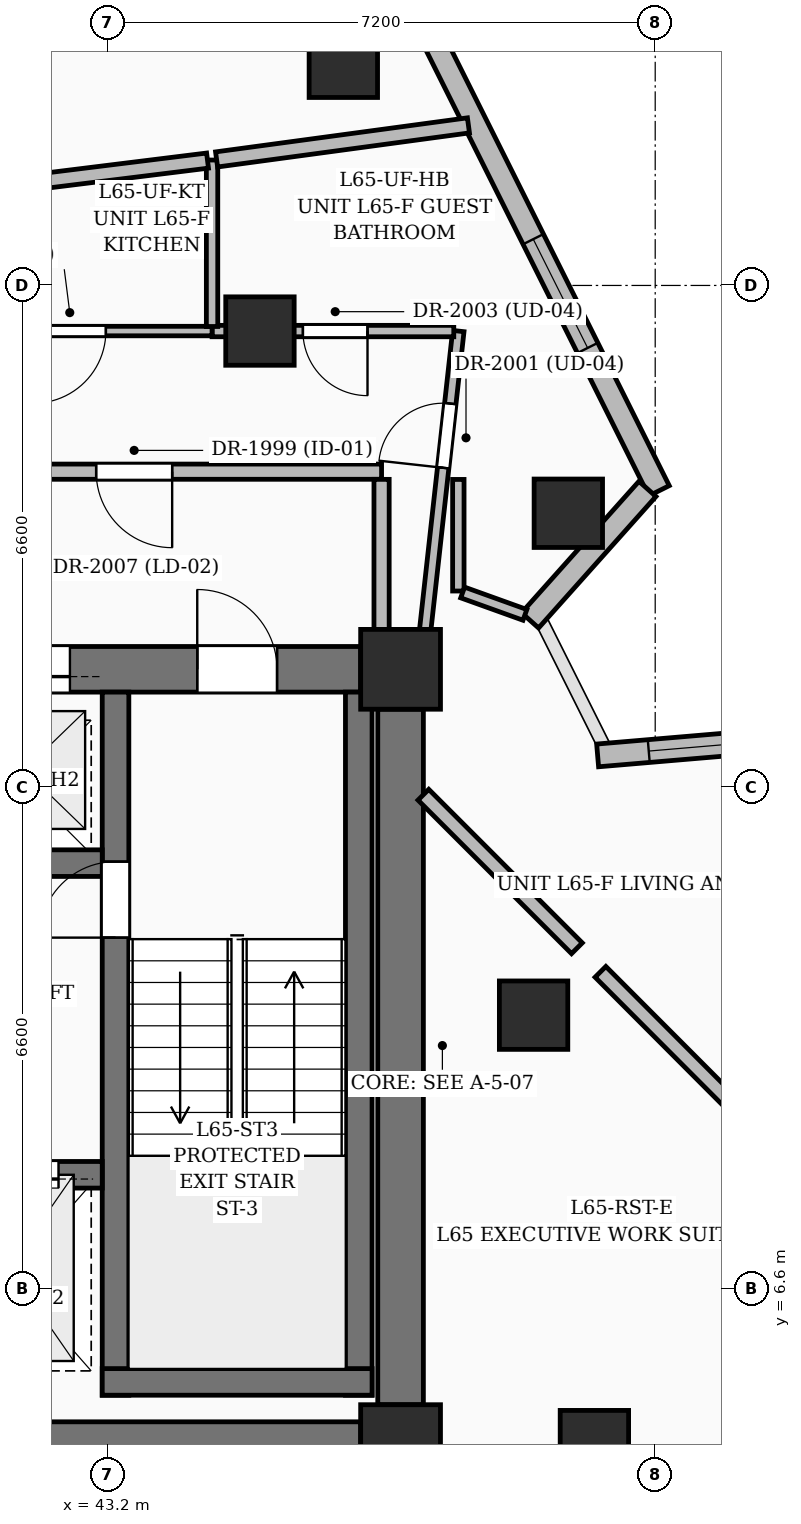
"""IFC4 building model, lengths in metres.
Left out: names, types, materials, properties, quantities, classifications, styles, units other than length and angle.
Written with IfcOpenShell. Run it as: python <this file> out.ifc"""

import sys

from ifc_helpers import new_model, si_unit, direction, frame, frame_2d, origin, origin_2d, place, context, subcontext, project, spatial, rectangle, extrude, element, fill, save


model = new_model("IFC4")
c1 = context("Model", 3, precision=1e-05, world=origin(), true_north=direction((0.0, 1.0)))
c2 = subcontext(c1, "Body", "Model", "MODEL_VIEW")
j1 = project(units=[si_unit("LENGTHUNIT", "METRE"), si_unit("PLANEANGLEUNIT", "RADIAN")], contexts=[c1])
p1 = place(None, origin())
s1 = spatial("IfcSite", under=j1, at=p1, CompositionType="ELEMENT")
p2 = place(p1, origin())
s2 = spatial("IfcBuilding", under=s1, at=p2, CompositionType="ELEMENT")
p3 = place(p2, frame((0.0, 0.0, 252.0)))
s3 = spatial("IfcBuildingStorey", under=s2, at=p3, CompositionType="ELEMENT", Elevation=252.0)
for number, where, z_axis, x_axis in (
    (1, (47.05, 4.55, 0.0), (0.0, 0.0, 1.0), (1.0, 0.0, 0.0)),
    (2, (47.05, 14.75, 0.0), (0.0, 0.0, 1.0), (1.0, 0.0, 0.0)),
):
    element("IfcColumn", number, at=place(p3, frame(where, z_axis=z_axis, x_axis=x_axis)), inside=s3, PredefinedType="COLUMN", context=c2, shape_type="SweptSolid", body=[
        extrude(rectangle(XDim=1.05, YDim=1.05, at=origin_2d()), origin(), (0.0, 0.0, 1.0), 3.75),
    ])
for number, where, z_axis, x_axis in (
    (3, (49.6, 4.55, 0.0), (0.0, 0.0, 1.0), (1.0, 0.0, 0.0)),
    (4, (48.8, 10.2, 0.0), (0.0, 0.0, 1.0), (1.0, 0.0, 0.0)),
    (5, (45.2, 19.2, 0.0), (0.0, 0.0, 1.0), (1.0, 0.0, 0.0)),
):
    element("IfcColumn", number, at=place(p3, frame(where, z_axis=z_axis, x_axis=x_axis)), inside=s3, PredefinedType="COLUMN", context=c2, shape_type="SweptSolid", body=[
        extrude(rectangle(XDim=0.9, YDim=0.9, at=origin_2d()), origin(), (0.0, 0.0, 1.0), 3.75),
    ])
p4 = place(p3, frame((35.675, 4.55, 0.0), z_axis=(0.0, 0.0, 1.0), x_axis=(1.0, 0.0, 0.0)))
e6 = element("IfcWall", 6, at=p4, inside=s3, PredefinedType="SHEAR", context=c2, shape_type="SweptSolid", body=[
    extrude(rectangle(XDim=10.85, YDim=0.6, at=frame_2d((5.425, 0.0))), origin(), (0.0, 0.0, 1.0), 3.75),
])
p5 = place(p3, frame((35.675, 14.75, 0.0), z_axis=(0.0, 0.0, 1.0), x_axis=(1.0, 0.0, 0.0)))
e7 = element("IfcWall", 7, at=p5, inside=s3, PredefinedType="SHEAR", context=c2, shape_type="SweptSolid", body=[
    extrude(rectangle(XDim=10.85, YDim=0.6, at=frame_2d((5.425, 0.0))), origin(), (0.0, 0.0, 1.0), 3.75),
])
p6 = place(p5, frame((1.1, 0.0, 0.0)))
e8 = element("IfcOpeningElement", 8, at=p6, cuts=e7, PredefinedType="OPENING", context=c2, shape_type="SweptSolid", body=[
    extrude(rectangle(XDim=1.05, YDim=2.15, at=frame_2d((0.525, 1.075))), frame((0.0, 0.31, 0.0), z_axis=(0.0, -1.0, 0.0), x_axis=(1.0, 0.0, 0.0)), (0.0, 0.0, 1.0), 0.62),
])
p7 = place(p5, frame((8.7, 0.0, 0.0)))
e9 = element("IfcOpeningElement", 9, at=p7, cuts=e7, PredefinedType="OPENING", context=c2, shape_type="SweptSolid", body=[
    extrude(rectangle(XDim=1.05, YDim=2.15, at=frame_2d((0.525, 1.075))), frame((0.0, 0.31, 0.0), z_axis=(0.0, -1.0, 0.0), x_axis=(1.0, 0.0, 0.0)), (0.0, 0.0, 1.0), 0.62),
])
p8 = place(p5, frame((3.825, 0.0, 0.0)))
e10 = element("IfcOpeningElement", 10, at=p8, cuts=e7, PredefinedType="OPENING", context=c2, shape_type="SweptSolid", body=[
    extrude(rectangle(XDim=1.2, YDim=2.2, at=frame_2d((0.6, 1.1))), frame((0.0, 0.31, 0.0), z_axis=(0.0, -1.0, 0.0), x_axis=(1.0, 0.0, 0.0)), (0.0, 0.0, 1.0), 0.62),
])
p9 = place(p5, frame((5.825, 0.0, 0.0)))
e11 = element("IfcOpeningElement", 11, at=p9, cuts=e7, PredefinedType="OPENING", context=c2, shape_type="SweptSolid", body=[
    extrude(rectangle(XDim=1.2, YDim=2.2, at=frame_2d((0.6, 1.1))), frame((0.0, 0.31, 0.0), z_axis=(0.0, -1.0, 0.0), x_axis=(1.0, 0.0, 0.0)), (0.0, 0.0, 1.0), 0.62),
])
p10 = place(p3, frame((47.05, 5.075, 0.0), z_axis=(0.0, 0.0, 1.0), x_axis=(0.0, 1.0, 0.0)))
e12 = element("IfcWall", 12, at=p10, inside=s3, PredefinedType="SHEAR", context=c2, shape_type="SweptSolid", body=[
    extrude(rectangle(XDim=9.15, YDim=0.6, at=frame_2d((4.575, 0.0))), origin(), (0.0, 0.0, 1.0), 3.75),
])
p11 = place(p3, frame((43.3, 5.2, 0.0), z_axis=(0.0, 0.0, 1.0), x_axis=(0.0, 1.0, 0.0)))
e13 = element("IfcWall", 13, at=p11, inside=s3, PredefinedType="SOLIDWALL", context=c2, shape_type="SweptSolid", body=[
    extrude(rectangle(XDim=9.25, YDim=0.35, at=frame_2d((4.625, 0.0))), origin(), (0.0, 0.0, 1.0), 3.75),
])
p12 = place(p11, frame((6.02, 0.0, 0.0)))
e14 = element("IfcOpeningElement", 14, at=p12, cuts=e13, PredefinedType="OPENING", context=c2, shape_type="SweptSolid", body=[
    extrude(rectangle(XDim=1.0, YDim=2.15, at=frame_2d((0.5, 1.075))), frame((0.0, 0.185, 0.0), z_axis=(0.0, -1.0, 0.0), x_axis=(1.0, 0.0, 0.0)), (0.0, 0.0, 1.0), 0.37),
])
p13 = place(p3, frame((46.5, 5.2, 0.0), z_axis=(0.0, 0.0, 1.0), x_axis=(0.0, 1.0, 0.0)))
e15 = element("IfcWall", 15, at=p13, inside=s3, PredefinedType="SOLIDWALL", context=c2, shape_type="SweptSolid", body=[
    extrude(rectangle(XDim=9.25, YDim=0.35, at=frame_2d((4.625, 0.0))), origin(), (0.0, 0.0, 1.0), 3.75),
])
p14 = place(p3, frame((43.125, 5.375, 0.0), z_axis=(0.0, 0.0, 1.0), x_axis=(1.0, 0.0, 0.0)))
e16 = element("IfcWall", 16, at=p14, inside=s3, PredefinedType="SOLIDWALL", context=c2, shape_type="SweptSolid", body=[
    extrude(rectangle(XDim=3.55, YDim=0.35, at=frame_2d((1.775, 0.0))), origin(), (0.0, 0.0, 1.0), 3.75),
])
p15 = place(p3, frame((40.55, 8.1, 0.0), z_axis=(0.0, 0.0, 1.0), x_axis=(1.0, 0.0, 0.0)))
e17 = element("IfcWall", 17, at=p15, inside=s3, PredefinedType="SOLIDWALL", context=c2, shape_type="SweptSolid", body=[
    extrude(rectangle(XDim=2.575, YDim=0.35, at=frame_2d((1.288, 0.0))), origin(), (0.0, 0.0, 1.0), 3.75),
])
p16 = place(p15, frame((0.7, 0.0, 0.0)))
e18 = element("IfcOpeningElement", 18, at=p16, cuts=e17, PredefinedType="OPENING", context=c2, shape_type="SweptSolid", body=[
    extrude(rectangle(XDim=1.3, YDim=2.25, at=frame_2d((0.65, 1.125))), frame((0.0, 0.185, 0.0), z_axis=(0.0, -1.0, 0.0), x_axis=(1.0, 0.0, 0.0)), (0.0, 0.0, 1.0), 0.37),
])
p17 = place(p3, frame((39.075, 12.2, 0.0), z_axis=(0.0, 0.0, 1.0), x_axis=(1.0, 0.0, 0.0)))
e19 = element("IfcWall", 19, at=p17, inside=s3, PredefinedType="SOLIDWALL", context=c2, shape_type="SweptSolid", body=[
    extrude(rectangle(XDim=4.05, YDim=0.35, at=frame_2d((2.025, 0.0))), origin(), (0.0, 0.0, 1.0), 3.75),
])
for number, where, z_axis, x_axis in (
    (20, (49.257, 16.803, 0.0), (0.0, 0.0, 1.0), (1.0, 0.0, 0.0)),
    (21, (46.297, 22.723, 0.0), (0.0, 0.0, 1.0), (1.0, 0.0, 0.0)),
):
    element("IfcColumn", number, at=place(p3, frame(where, z_axis=z_axis, x_axis=x_axis)), inside=s3, PredefinedType="COLUMN", context=c2, shape_type="SweptSolid", body=[
        extrude(rectangle(XDim=0.9, YDim=0.9, at=origin_2d()), origin(), (0.0, 0.0, 1.0), 3.75),
    ])
p18 = place(p3, frame((47.409, 23.182, 0.0), z_axis=(0.0, 0.0, 1.0), x_axis=(0.447227954985, -0.894420011113, 0.0)))
e22 = element("IfcWall", 22, at=p18, inside=s3, PredefinedType="SOLIDWALL", context=c2, shape_type="SweptSolid", body=[
    extrude(rectangle(XDim=6.801, YDim=0.3, at=frame_2d((3.4, 0.0))), origin(), (0.0, 0.0, 1.0), 3.5),
])
p19 = place(p18, frame((3.1, 0.0, 0.55)))
e23 = element("IfcOpeningElement", 23, at=p19, cuts=e22, PredefinedType="OPENING", context=c2, shape_type="SweptSolid", body=[
    extrude(rectangle(XDim=1.6, YDim=2.2, at=frame_2d((0.8, 1.1))), frame((0.0, 0.16, 0.0), z_axis=(0.0, -1.0, 0.0), x_axis=(1.0, 0.0, 0.0)), (0.0, 0.0, 1.0), 0.32),
])
p20 = place(p3, frame((50.298, 17.123, 0.0), z_axis=(0.0, 0.0, 1.0), x_axis=(-0.665963458611, -0.74598436431, 0.0)))
e24 = element("IfcWall", 24, at=p20, inside=s3, PredefinedType="SOLIDWALL", context=c2, shape_type="SweptSolid", body=[
    extrude(rectangle(XDim=2.319, YDim=0.3, at=frame_2d((1.159, 0.0))), origin(), (0.0, 0.0, 1.0), 2.825),
])
p21 = place(p3, frame((49.643, 13.617, 0.0), z_axis=(0.0, 0.0, 1.0), x_axis=(0.996404097451, 0.084728239579, 0.0)))
e25 = element("IfcWall", 25, at=p21, inside=s3, PredefinedType="SOLIDWALL", context=c2, shape_type="SweptSolid", body=[
    extrude(rectangle(XDim=2.593, YDim=0.3, at=frame_2d((1.297, 0.0))), origin(), (0.0, 0.0, 1.0), 2.825),
])
p22 = place(p21, frame((0.675, 0.0, 0.8)))
e26 = element("IfcOpeningElement", 26, at=p22, cuts=e25, PredefinedType="OPENING", context=c2, shape_type="SweptSolid", body=[
    extrude(rectangle(XDim=1.2, YDim=1.8, at=frame_2d((0.6, 0.9))), frame((0.0, 0.16, 0.0), z_axis=(0.0, -1.0, 0.0), x_axis=(1.0, 0.0, 0.0)), (0.0, 0.0, 1.0), 0.32),
])
p23 = place(p3, frame((46.8, 17.35, 0.0), z_axis=(0.0, 0.0, 1.0), x_axis=(-1.0, 0.0, 0.0)))
e27 = element("IfcWall", 27, at=p23, inside=s3, PredefinedType="PARTITIONING", context=c2, shape_type="SweptSolid", body=[
    extrude(rectangle(XDim=6.51, YDim=0.2, at=frame_2d((3.255, 0.0))), origin(), (0.0, 0.0, 1.0), 2.685),
])
p24 = place(p23, frame((2.755, 0.0, 0.0)))
e28 = element("IfcOpeningElement", 28, at=p24, cuts=e27, PredefinedType="OPENING", context=c2, shape_type="SweptSolid", body=[
    extrude(rectangle(XDim=1.0, YDim=2.2, at=frame_2d((0.5, 1.1))), frame((0.0, 0.11, 0.0), z_axis=(0.0, -1.0, 0.0), x_axis=(1.0, 0.0, 0.0)), (0.0, 0.0, 1.0), 0.22),
])
p25 = place(p3, frame((49.37, 11.08, 0.0), z_axis=(0.0, 0.0, 1.0), x_axis=(-0.707106781187, 0.707106781187, 0.0)))
e29 = element("IfcWall", 29, at=p25, inside=s3, PredefinedType="PARTITIONING", context=c2, shape_type="SweptSolid", body=[
    extrude(rectangle(XDim=2.857, YDim=0.2, at=frame_2d((1.428, 0.0))), origin(), (0.0, 0.0, 1.0), 3.5),
])
p26 = place(p3, frame((47.35, 15.05, 0.0), z_axis=(0.0, 0.0, 1.0), x_axis=(0.110161978568, 0.993913647395, 0.0)))
e30 = element("IfcWall", 30, at=p26, inside=s3, PredefinedType="PARTITIONING", context=c2, shape_type="SweptSolid", body=[
    extrude(rectangle(XDim=4.175, YDim=0.15, at=frame_2d((2.088, 0.0))), origin(), (0.0, 0.0, 1.0), 2.764),
])
p27 = place(p26, frame((2.365, 0.0, 0.0)))
e31 = element("IfcOpeningElement", 31, at=p27, cuts=e30, PredefinedType="OPENING", context=c2, shape_type="SweptSolid", body=[
    extrude(rectangle(XDim=0.85, YDim=2.1, at=frame_2d((0.425, 1.05))), frame((0.0, 0.085, 0.0), z_axis=(0.0, -1.0, 0.0), x_axis=(1.0, 0.0, 0.0)), (0.0, 0.0, 1.0), 0.17),
])
p28 = place(p3, frame((47.75, 19.2, 0.0), z_axis=(0.0, 0.0, 1.0), x_axis=(-1.0, 0.0, 0.0)))
e32 = element("IfcWall", 32, at=p28, inside=s3, PredefinedType="PARTITIONING", context=c2, shape_type="SweptSolid", body=[
    extrude(rectangle(XDim=3.18, YDim=0.15, at=frame_2d((1.59, 0.0))), origin(), (0.0, 0.0, 1.0), 2.82),
])
p29 = place(p28, frame((1.135, 0.0, 0.0)))
e33 = element("IfcOpeningElement", 33, at=p29, cuts=e32, PredefinedType="OPENING", context=c2, shape_type="SweptSolid", body=[
    extrude(rectangle(XDim=0.85, YDim=2.1, at=frame_2d((0.425, 1.05))), frame((0.0, 0.085, 0.0), z_axis=(0.0, -1.0, 0.0), x_axis=(1.0, 0.0, 0.0)), (0.0, 0.0, 1.0), 0.17),
])
p30 = place(p3, frame((44.57, 19.2, 0.0), z_axis=(0.0, 0.0, 1.0), x_axis=(-1.0, 0.0, 0.0)))
e34 = element("IfcWall", 34, at=p30, inside=s3, PredefinedType="PARTITIONING", context=c2, shape_type="SweptSolid", body=[
    extrude(rectangle(XDim=3.63, YDim=0.125, at=frame_2d((1.815, 0.0))), origin(), (0.0, 0.0, 1.0), 3.003),
])
p31 = place(p30, frame((1.397, 0.0, 0.0)))
e35 = element("IfcOpeningElement", 35, at=p31, cuts=e34, PredefinedType="OPENING", context=c2, shape_type="SweptSolid", body=[
    extrude(rectangle(XDim=0.95, YDim=2.2, at=frame_2d((0.475, 1.1))), frame((0.0, 0.072, 0.0), z_axis=(0.0, -1.0, 0.0), x_axis=(1.0, 0.0, 0.0)), (0.0, 0.0, 1.0), 0.145),
])
p32 = place(p3, frame((44.57, 21.45, 0.0), z_axis=(0.0, 0.0, 1.0), x_axis=(0.0, -1.0, 0.0)))
e36 = element("IfcWall", 36, at=p32, inside=s3, PredefinedType="PARTITIONING", context=c2, shape_type="SweptSolid", body=[
    extrude(rectangle(XDim=2.19, YDim=0.15, at=frame_2d((1.095, 0.0))), origin(), (0.0, 0.0, 1.0), 2.685),
])
p33 = place(p3, frame((47.943, 21.906, 0.0), z_axis=(0.0, 0.0, 1.0), x_axis=(-0.99097487628, -0.134047732473, 0.0)))
e37 = element("IfcWall", 37, at=p33, inside=s3, PredefinedType="PARTITIONING", context=c2, shape_type="SweptSolid", body=[
    extrude(rectangle(XDim=3.344, YDim=0.2, at=frame_2d((1.672, 0.0))), origin(), (0.0, 0.0, 1.0), 2.685),
])
p34 = place(p3, frame((44.51, 21.443, 0.0), z_axis=(0.0, 0.0, 1.0), x_axis=(-0.992404306197, -0.123019075928, 0.0)))
e38 = element("IfcWall", 38, at=p34, inside=s3, PredefinedType="PARTITIONING", context=c2, shape_type="SweptSolid", body=[
    extrude(rectangle(XDim=3.55, YDim=0.2, at=frame_2d((1.775, 0.0))), origin(), (0.0, 0.0, 1.0), 2.685),
])
p35 = place(p3, frame((46.8, 15.05, 0.0), z_axis=(0.0, 0.0, 1.0), x_axis=(0.0, 1.0, 0.0)))
e39 = element("IfcWall", 39, at=p35, inside=s3, PredefinedType="PARTITIONING", context=c2, shape_type="SweptSolid", body=[
    extrude(rectangle(XDim=2.199, YDim=0.2, at=frame_2d((1.1, 0.0))), origin(), (0.0, 0.0, 1.0), 2.685),
])
p36 = place(p3, frame((54.894, 5.542, 0.0), z_axis=(0.0, 0.0, 1.0), x_axis=(-0.706163807967, 0.708048498563, 0.0)))
e40 = element("IfcWall", 40, at=p36, inside=s3, PredefinedType="PARTITIONING", context=c2, shape_type="SweptSolid", body=[
    extrude(rectangle(XDim=7.384, YDim=0.2, at=frame_2d((3.692, 0.0))), origin(), (0.0, 0.0, 1.0), 2.764),
])
p37 = place(p3, frame((47.81, 17.248, 0.0), z_axis=(0.0, 0.0, 1.0), x_axis=(0.0, -1.0, 0.0)))
e41 = element("IfcWall", 41, at=p37, inside=s3, PredefinedType="PARTITIONING", context=c2, shape_type="SweptSolid", body=[
    extrude(rectangle(XDim=1.468, YDim=0.15, at=frame_2d((0.734, 0.0))), origin(), (0.0, 0.0, 1.0), 3.5),
])
p38 = place(p3, frame((47.867, 15.76, 0.0), z_axis=(0.0, 0.0, 1.0), x_axis=(0.941080294182, -0.338183204643, 0.0)))
e42 = element("IfcWall", 42, at=p38, inside=s3, PredefinedType="PARTITIONING", context=c2, shape_type="SweptSolid", body=[
    extrude(rectangle(XDim=0.871, YDim=0.15, at=frame_2d((0.435, 0.0))), origin(), (0.0, 0.0, 1.0), 2.764),
])
p39 = place(p19, origin())
e43 = element("IfcWindow", 43, at=p39, inside=s3, PartitioningType="SINGLE_PANEL", PredefinedType="WINDOW", context=c2, shape_type="SweptSolid", body=[
    extrude(rectangle(XDim=1.6, YDim=2.2, at=frame_2d((0.8, 1.1))), frame((0.0, 0.03, 0.0), z_axis=(0.0, -1.0, 0.0), x_axis=(1.0, 0.0, 0.0)), (0.0, 0.0, 1.0), 0.06),
])
fill(e23, e43)
p40 = place(p22, origin())
e44 = element("IfcWindow", 44, at=p40, inside=s3, PartitioningType="SINGLE_PANEL", PredefinedType="WINDOW", context=c2, shape_type="SweptSolid", body=[
    extrude(rectangle(XDim=1.2, YDim=1.8, at=frame_2d((0.6, 0.9))), frame((0.0, 0.03, 0.0), z_axis=(0.0, -1.0, 0.0), x_axis=(1.0, 0.0, 0.0)), (0.0, 0.0, 1.0), 0.06),
])
fill(e26, e44)
p41 = place(p7, origin())
e45 = element("IfcDoor", 45, at=p41, inside=s3, OperationType="SINGLE_SWING_LEFT", PredefinedType="DOOR", context=c2, shape_type="SweptSolid", body=[
    extrude(rectangle(XDim=1.05, YDim=2.15, at=frame_2d((0.525, 1.075))), frame((0.0, 0.025, 0.0), z_axis=(0.0, -1.0, 0.0), x_axis=(1.0, 0.0, 0.0)), (0.0, 0.0, 1.0), 0.05),
])
fill(e9, e45)
p42 = place(p12, origin())
e46 = element("IfcDoor", 46, at=p42, inside=s3, OperationType="SINGLE_SWING_LEFT", PredefinedType="DOOR", context=c2, shape_type="SweptSolid", body=[
    extrude(rectangle(XDim=1.0, YDim=2.15, at=frame_2d((0.5, 1.075))), frame((0.0, 0.025, 0.0), z_axis=(0.0, -1.0, 0.0), x_axis=(1.0, 0.0, 0.0)), (0.0, 0.0, 1.0), 0.05),
])
fill(e14, e46)
p43 = place(p16, origin())
e47 = element("IfcDoor", 47, at=p43, inside=s3, OperationType="DOUBLE_DOOR_SLIDING", PredefinedType="DOOR", context=c2, shape_type="SweptSolid", body=[
    extrude(rectangle(XDim=1.3, YDim=2.25, at=frame_2d((0.65, 1.125))), frame((0.0, 0.025, 0.0), z_axis=(0.0, -1.0, 0.0), x_axis=(1.0, 0.0, 0.0)), (0.0, 0.0, 1.0), 0.05),
])
fill(e18, e47)
p44 = place(p9, origin())
e48 = element("IfcDoor", 48, at=p44, inside=s3, OperationType="DOUBLE_DOOR_SLIDING", PredefinedType="DOOR", context=c2, shape_type="SweptSolid", body=[
    extrude(rectangle(XDim=1.2, YDim=2.2, at=frame_2d((0.6, 1.1))), frame((0.0, 0.025, 0.0), z_axis=(0.0, -1.0, 0.0), x_axis=(1.0, 0.0, 0.0)), (0.0, 0.0, 1.0), 0.05),
])
fill(e11, e48)
p45 = place(p24, origin())
e49 = element("IfcDoor", 49, at=p45, inside=s3, OperationType="SINGLE_SWING_LEFT", PredefinedType="DOOR", context=c2, shape_type="SweptSolid", body=[
    extrude(rectangle(XDim=1.0, YDim=2.2, at=frame_2d((0.5, 1.1))), frame((0.0, 0.025, 0.0), z_axis=(0.0, -1.0, 0.0), x_axis=(1.0, 0.0, 0.0)), (0.0, 0.0, 1.0), 0.05),
])
fill(e28, e49)
p46 = place(p31, origin())
e50 = element("IfcDoor", 50, at=p46, inside=s3, OperationType="SINGLE_SWING_RIGHT", PredefinedType="DOOR", context=c2, shape_type="SweptSolid", body=[
    extrude(rectangle(XDim=0.95, YDim=2.2, at=frame_2d((0.475, 1.1))), frame((0.0, 0.025, 0.0), z_axis=(0.0, -1.0, 0.0), x_axis=(1.0, 0.0, 0.0)), (0.0, 0.0, 1.0), 0.05),
])
fill(e35, e50)
p47 = place(p27, origin())
e51 = element("IfcDoor", 51, at=p47, inside=s3, OperationType="SINGLE_SWING_LEFT", PredefinedType="DOOR", context=c2, shape_type="SweptSolid", body=[
    extrude(rectangle(XDim=0.85, YDim=2.1, at=frame_2d((0.425, 1.05))), frame((0.0, 0.025, 0.0), z_axis=(0.0, -1.0, 0.0), x_axis=(1.0, 0.0, 0.0)), (0.0, 0.0, 1.0), 0.05),
])
fill(e31, e51)
p48 = place(p29, origin())
e52 = element("IfcDoor", 52, at=p48, inside=s3, OperationType="SINGLE_SWING_LEFT", PredefinedType="DOOR", context=c2, shape_type="SweptSolid", body=[
    extrude(rectangle(XDim=0.85, YDim=2.1, at=frame_2d((0.425, 1.05))), frame((0.0, 0.025, 0.0), z_axis=(0.0, -1.0, 0.0), x_axis=(1.0, 0.0, 0.0)), (0.0, 0.0, 1.0), 0.05),
])
fill(e33, e52)
save(model, sys.argv[1])
